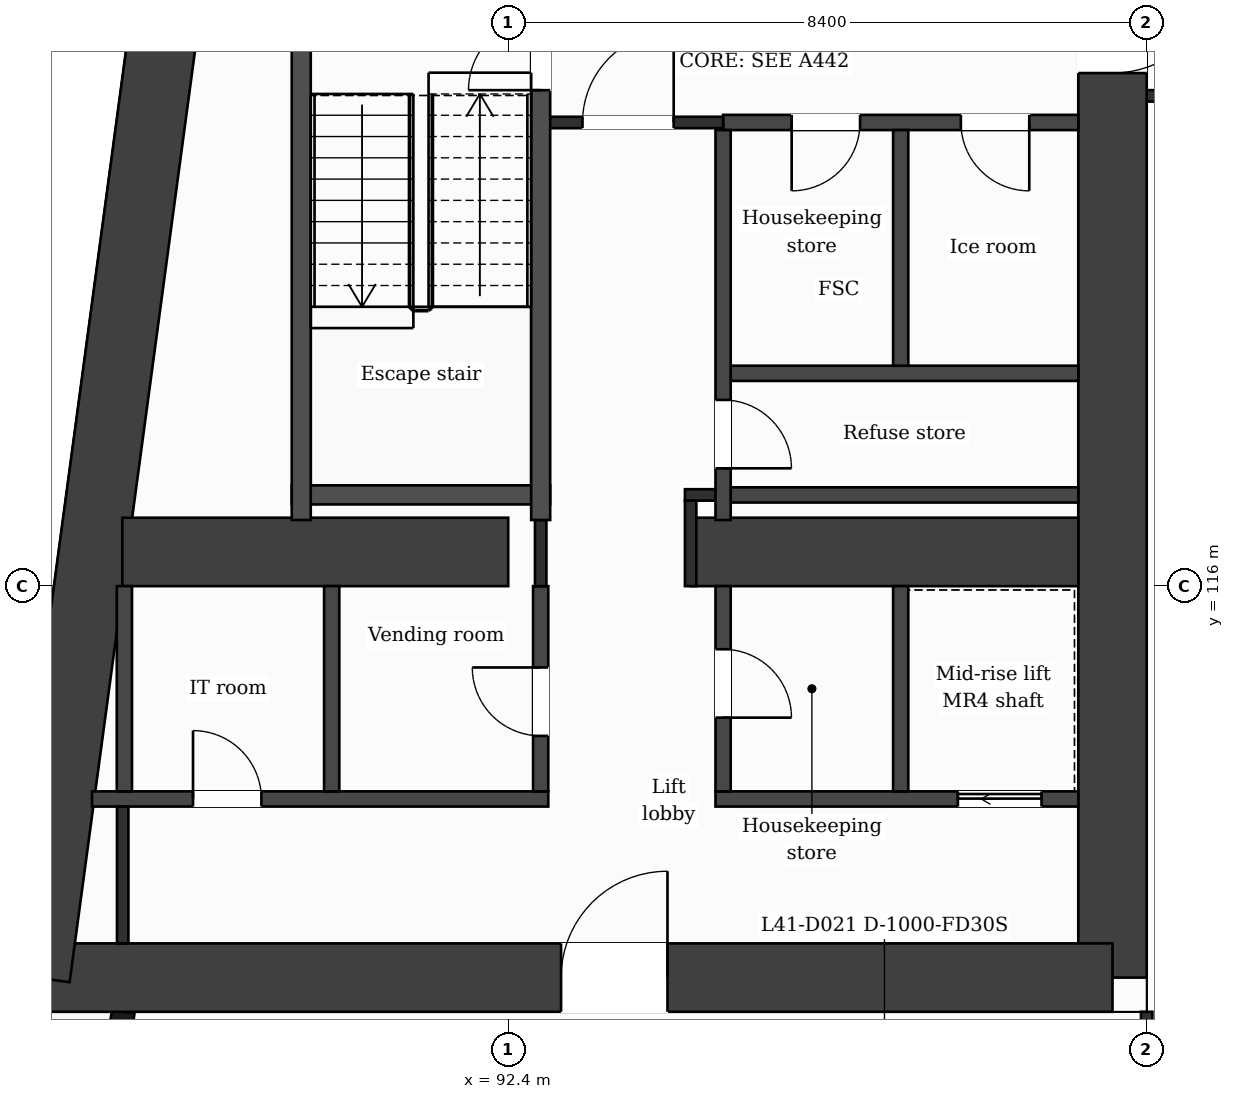
"""IFC4 building model, lengths in metres.
Left out: names, types, materials, properties, quantities, classifications, styles, units other than length and angle.
Written with IfcOpenShell. Run it as: python <this file> out.ifc"""

import sys

from ifc_helpers import new_model, si_unit, direction, frame, frame_2d, origin, place, context, subcontext, project, spatial, rectangle, extrude, element, fill, save


model = new_model("IFC4")
c1 = context("Model", 3, precision=1e-05, world=origin(), true_north=direction((0.0, 1.0)))
c2 = subcontext(c1, "Body", "Model", "MODEL_VIEW")
j1 = project(units=[si_unit("LENGTHUNIT", "METRE"), si_unit("PLANEANGLEUNIT", "RADIAN")], contexts=[c1])
p1 = place(None, origin())
s1 = spatial("IfcSite", under=j1, at=p1, CompositionType="ELEMENT")
p2 = place(p1, origin())
s2 = spatial("IfcBuilding", under=s1, at=p2, CompositionType="ELEMENT")
p3 = place(p2, frame((0.0, 0.0, 173.7)))
s3 = spatial("IfcBuildingStorey", under=s2, at=p3, CompositionType="ELEMENT", Elevation=173.7)
p4 = place(p3, frame((100.35, 131.95, 0.0), z_axis=(0.0, 0.0, 1.0), x_axis=(0.0, -1.0, 0.0)))
e1 = element("IfcWall", 1, at=p4, inside=s3, PredefinedType="SHEAR", context=c2, shape_type="SweptSolid", body=[
    extrude(rectangle(XDim=21.1, YDim=0.9, at=frame_2d((10.55, 0.0))), origin(), (0.0, 0.0, 1.0), 3.7),
])
p5 = place(p4, frame((7.8, 0.0, 0.0)))
e2 = element("IfcOpeningElement", 2, at=p5, cuts=e1, PredefinedType="OPENING", context=c2, shape_type="SweptSolid", body=[
    extrude(rectangle(XDim=1.4, YDim=2.1, at=frame_2d((0.7, 1.05))), frame((0.0, 0.46, 0.0), z_axis=(0.0, -1.0, 0.0), x_axis=(1.0, 0.0, 0.0)), (0.0, 0.0, 1.0), 0.92),
])
p6 = place(p3, frame((100.35, 110.85, 0.0), z_axis=(0.0, 0.0, 1.0), x_axis=(-1.0, 0.0, 0.0)))
e3 = element("IfcWall", 3, at=p6, inside=s3, PredefinedType="SHEAR", context=c2, shape_type="SweptSolid", body=[
    extrude(rectangle(XDim=14.166, YDim=0.9, at=frame_2d((7.083, 0.0))), origin(), (0.0, 0.0, 1.0), 3.7),
])
p7 = place(p6, frame((5.855, 0.0, 0.0)))
e4 = element("IfcOpeningElement", 4, at=p7, cuts=e3, PredefinedType="OPENING", context=c2, shape_type="SweptSolid", body=[
    extrude(rectangle(XDim=1.4, YDim=2.1, at=frame_2d((0.7, 1.05))), frame((0.0, 0.46, 0.0), z_axis=(0.0, -1.0, 0.0), x_axis=(1.0, 0.0, 0.0)), (0.0, 0.0, 1.0), 0.92),
])
p8 = place(p3, frame((86.184, 110.85, 0.0), z_axis=(0.0, 0.0, 1.0), x_axis=(0.133410495943, 0.991060865725, 0.0)))
e5 = element("IfcWall", 5, at=p8, inside=s3, PredefinedType="SHEAR", context=c2, shape_type="SweptSolid", body=[
    extrude(rectangle(XDim=21.29, YDim=0.9, at=frame_2d((10.645, 0.0))), origin(), (0.0, 0.0, 1.0), 3.7),
])
p9 = place(p3, frame((87.323, 116.45, 0.0), z_axis=(0.0, 0.0, 1.0), x_axis=(1.0, 0.0, 0.0)))
e6 = element("IfcWall", 6, at=p9, inside=s3, PredefinedType="SHEAR", context=c2, shape_type="SweptSolid", body=[
    extrude(rectangle(XDim=5.077, YDim=0.9, at=frame_2d((2.539, 0.0))), origin(), (0.0, 0.0, 1.0), 3.7),
])
p10 = place(p3, frame((94.8, 116.45, 0.0), z_axis=(0.0, 0.0, 1.0), x_axis=(1.0, 0.0, 0.0)))
e7 = element("IfcWall", 7, at=p10, inside=s3, PredefinedType="SHEAR", context=c2, shape_type="SweptSolid", body=[
    extrude(rectangle(XDim=5.1, YDim=0.9, at=frame_2d((2.55, 0.0))), origin(), (0.0, 0.0, 1.0), 3.7),
])
p11 = place(p3, frame((87.334, 110.4, 0.0), z_axis=(0.0, 0.0, 1.0), x_axis=(-0.133437175554, -0.991057273915, 0.0)))
e8 = element("IfcWall", 8, at=p11, inside=s3, PredefinedType="SOLIDWALL", context=c2, shape_type="SweptSolid", body=[
    extrude(rectangle(XDim=6.781, YDim=0.3, at=frame_2d((3.39, 0.0))), origin(), (0.0, 0.0, 1.0), 3.38),
])
p12 = place(p11, frame((1.418, 0.0, 0.0)))
e9 = element("IfcOpeningElement", 9, at=p12, cuts=e8, PredefinedType="OPENING", context=c2, shape_type="SweptSolid", body=[
    extrude(rectangle(XDim=1.2, YDim=2.4, at=frame_2d((0.6, 1.2))), frame((0.0, 0.16, 0.0), z_axis=(0.0, -1.0, 0.0), x_axis=(1.0, 0.0, 0.0)), (0.0, 0.0, 1.0), 0.32),
])
p13 = place(p11, frame((4.758, 0.0, 0.9)))
e10 = element("IfcOpeningElement", 10, at=p13, cuts=e8, PredefinedType="OPENING", context=c2, shape_type="SweptSolid", body=[
    extrude(rectangle(XDim=1.2, YDim=2.1, at=frame_2d((0.6, 1.05))), frame((0.0, 0.16, 0.0), z_axis=(0.0, -1.0, 0.0), x_axis=(1.0, 0.0, 0.0)), (0.0, 0.0, 1.0), 0.32),
])
p14 = place(p3, frame((86.924, 113.2, 0.0), z_axis=(0.0, 0.0, 1.0), x_axis=(1.0, 0.0, 0.0)))
e11 = element("IfcWall", 11, at=p14, inside=s3, PredefinedType="PARTITIONING", context=c2, shape_type="SweptSolid", body=[
    extrude(rectangle(XDim=6.003, YDim=0.2, at=frame_2d((3.001, 0.0))), origin(), (0.0, 0.0, 1.0), 3.38),
])
p15 = place(p14, frame((1.329, 0.0, 0.0)))
e12 = element("IfcOpeningElement", 12, at=p15, cuts=e11, PredefinedType="OPENING", context=c2, shape_type="SweptSolid", body=[
    extrude(rectangle(XDim=0.9, YDim=2.1, at=frame_2d((0.45, 1.05))), frame((0.0, 0.11, 0.0), z_axis=(0.0, -1.0, 0.0), x_axis=(1.0, 0.0, 0.0)), (0.0, 0.0, 1.0), 0.22),
])
p16 = place(p3, frame((95.127, 113.2, 0.0), z_axis=(0.0, 0.0, 1.0), x_axis=(1.0, 0.0, 0.0)))
e13 = element("IfcWall", 13, at=p16, inside=s3, PredefinedType="PARTITIONING", context=c2, shape_type="SweptSolid", body=[
    extrude(rectangle(XDim=4.773, YDim=0.2, at=frame_2d((2.386, 0.0))), origin(), (0.0, 0.0, 1.0), 3.38),
])
p17 = place(p16, frame((3.189, 0.0, 0.0)))
e14 = element("IfcOpeningElement", 14, at=p17, cuts=e13, PredefinedType="OPENING", context=c2, shape_type="SweptSolid", body=[
    extrude(rectangle(XDim=1.1, YDim=2.1, at=frame_2d((0.55, 1.05))), frame((0.0, 0.11, 0.0), z_axis=(0.0, -1.0, 0.0), x_axis=(1.0, 0.0, 0.0)), (0.0, 0.0, 1.0), 0.22),
])
p18 = place(p3, frame((95.227, 117.2, 0.0), z_axis=(0.0, 0.0, 1.0), x_axis=(1.0, 0.0, 0.0)))
e15 = element("IfcWall", 15, at=p18, inside=s3, PredefinedType="PARTITIONING", context=c2, shape_type="SweptSolid", body=[
    extrude(rectangle(XDim=4.673, YDim=0.2, at=frame_2d((2.336, 0.0))), origin(), (0.0, 0.0, 1.0), 3.38),
])
p19 = place(p3, frame((94.725, 117.2, 0.0), z_axis=(0.0, 0.0, 1.0), x_axis=(1.0, 0.0, 0.0)))
e16 = element("IfcWall", 16, at=p19, inside=s3, PredefinedType="PARTITIONING", context=c2, shape_type="SweptSolid", body=[
    extrude(rectangle(XDim=0.502, YDim=0.15, at=frame_2d((0.251, 0.0))), origin(), (0.0, 0.0, 1.0), 3.38),
])
p20 = place(p3, frame((89.552, 117.2, 0.0), z_axis=(0.0, 0.0, 1.0), x_axis=(1.0, 0.0, 0.0)))
e17 = element("IfcWall", 17, at=p20, inside=s3, PredefinedType="PARTITIONING", context=c2, shape_type="SweptSolid", body=[
    extrude(rectangle(XDim=3.4, YDim=0.25, at=frame_2d((1.7, 0.0))), origin(), (0.0, 0.0, 1.0), 3.38),
])
p21 = place(p3, frame((95.227, 118.8, 0.0), z_axis=(0.0, 0.0, 1.0), x_axis=(1.0, 0.0, 0.0)))
e18 = element("IfcWall", 18, at=p21, inside=s3, PredefinedType="PARTITIONING", context=c2, shape_type="SweptSolid", body=[
    extrude(rectangle(XDim=4.673, YDim=0.2, at=frame_2d((2.336, 0.0))), origin(), (0.0, 0.0, 1.0), 3.38),
])
p22 = place(p3, frame((95.227, 122.1, 0.0), z_axis=(0.0, 0.0, 1.0), x_axis=(1.0, 0.0, 0.0)))
e19 = element("IfcWall", 19, at=p22, inside=s3, PredefinedType="PARTITIONING", context=c2, shape_type="SweptSolid", body=[
    extrude(rectangle(XDim=4.673, YDim=0.2, at=frame_2d((2.336, 0.0))), origin(), (0.0, 0.0, 1.0), 3.38),
])
p23 = place(p22, frame((0.902, 0.0, 0.0)))
e20 = element("IfcOpeningElement", 20, at=p23, cuts=e19, PredefinedType="OPENING", context=c2, shape_type="SweptSolid", body=[
    extrude(rectangle(XDim=0.9, YDim=2.1, at=frame_2d((0.45, 1.05))), frame((0.0, 0.11, 0.0), z_axis=(0.0, -1.0, 0.0), x_axis=(1.0, 0.0, 0.0)), (0.0, 0.0, 1.0), 0.22),
])
p24 = place(p22, frame((3.128, 0.0, 0.0)))
e21 = element("IfcOpeningElement", 21, at=p24, cuts=e19, PredefinedType="OPENING", context=c2, shape_type="SweptSolid", body=[
    extrude(rectangle(XDim=0.9, YDim=2.1, at=frame_2d((0.45, 1.05))), frame((0.0, 0.11, 0.0), z_axis=(0.0, -1.0, 0.0), x_axis=(1.0, 0.0, 0.0)), (0.0, 0.0, 1.0), 0.22),
])
p25 = place(p3, frame((92.827, 122.1, 0.0), z_axis=(0.0, 0.0, 1.0), x_axis=(1.0, 0.0, 0.0)))
e22 = element("IfcWall", 22, at=p25, inside=s3, PredefinedType="PARTITIONING", context=c2, shape_type="SweptSolid", body=[
    extrude(rectangle(XDim=2.4, YDim=0.15, at=frame_2d((1.2, 0.0))), origin(), (0.0, 0.0, 1.0), 3.38),
])
p26 = place(p25, frame((0.55, 0.0, 0.0)))
e23 = element("IfcOpeningElement", 23, at=p26, cuts=e22, PredefinedType="OPENING", context=c2, shape_type="SweptSolid", body=[
    extrude(rectangle(XDim=1.2, YDim=2.1, at=frame_2d((0.6, 1.05))), frame((0.0, 0.085, 0.0), z_axis=(0.0, -1.0, 0.0), x_axis=(1.0, 0.0, 0.0)), (0.0, 0.0, 1.0), 0.17),
])
p27 = place(p3, frame((100.8, 122.45, 0.0), z_axis=(0.0, 0.0, 1.0), x_axis=(1.0, 0.0, 0.0)))
e24 = element("IfcWall", 24, at=p27, inside=s3, PredefinedType="PARTITIONING", context=c2, shape_type="SweptSolid", body=[
    extrude(rectangle(XDim=25.2, YDim=0.15, at=frame_2d((12.6, 0.0))), origin(), (0.0, 0.0, 1.0), 3.38),
])
p28 = place(p3, frame((87.35, 113.3, 0.0), z_axis=(0.0, 0.0, 1.0), x_axis=(0.0, 1.0, 0.0)))
e25 = element("IfcWall", 25, at=p28, inside=s3, PredefinedType="PARTITIONING", context=c2, shape_type="SweptSolid", body=[
    extrude(rectangle(XDim=2.7, YDim=0.2, at=frame_2d((1.35, 0.0))), origin(), (0.0, 0.0, 1.0), 3.38),
])
p29 = place(p3, frame((87.328, 111.3, 0.0), z_axis=(0.0, 0.0, 1.0), x_axis=(0.0, 1.0, 0.0)))
e26 = element("IfcWall", 26, at=p29, inside=s3, PredefinedType="PARTITIONING", context=c2, shape_type="SweptSolid", body=[
    extrude(rectangle(XDim=1.8, YDim=0.15, at=frame_2d((0.9, 0.0))), origin(), (0.0, 0.0, 1.0), 3.38),
])
p30 = place(p3, frame((89.677, 116.87, 0.0), z_axis=(0.0, 0.0, 1.0), x_axis=(0.0, 1.0, 0.0)))
e27 = element("IfcWall", 27, at=p30, inside=s3, PredefinedType="PARTITIONING", context=c2, shape_type="SweptSolid", body=[
    extrude(rectangle(XDim=6.955, YDim=0.25, at=frame_2d((3.478, 0.0))), origin(), (0.0, 0.0, 1.0), 3.38),
])
p31 = place(p3, frame((90.077, 113.3, 0.0), z_axis=(0.0, 0.0, 1.0), x_axis=(0.0, 1.0, 0.0)))
e28 = element("IfcWall", 28, at=p31, inside=s3, PredefinedType="PARTITIONING", context=c2, shape_type="SweptSolid", body=[
    extrude(rectangle(XDim=2.7, YDim=0.2, at=frame_2d((1.35, 0.0))), origin(), (0.0, 0.0, 1.0), 3.38),
])
p32 = place(p3, frame((92.827, 113.3, 0.0), z_axis=(0.0, 0.0, 1.0), x_axis=(0.0, 1.0, 0.0)))
e29 = element("IfcWall", 29, at=p32, inside=s3, PredefinedType="PARTITIONING", context=c2, shape_type="SweptSolid", body=[
    extrude(rectangle(XDim=2.7, YDim=0.2, at=frame_2d((1.35, 0.0))), origin(), (0.0, 0.0, 1.0), 3.38),
])
p33 = place(p32, frame((0.73, 0.0, 0.0)))
e30 = element("IfcOpeningElement", 30, at=p33, cuts=e29, PredefinedType="OPENING", context=c2, shape_type="SweptSolid", body=[
    extrude(rectangle(XDim=0.9, YDim=2.1, at=frame_2d((0.45, 1.05))), frame((0.0, 0.11, 0.0), z_axis=(0.0, -1.0, 0.0), x_axis=(1.0, 0.0, 0.0)), (0.0, 0.0, 1.0), 0.22),
])
p34 = place(p3, frame((92.827, 116.0, 0.0), z_axis=(0.0, 0.0, 1.0), x_axis=(0.0, 1.0, 0.0)))
e31 = element("IfcWall", 31, at=p34, inside=s3, PredefinedType="PARTITIONING", context=c2, shape_type="SweptSolid", body=[
    extrude(rectangle(XDim=0.87, YDim=0.15, at=frame_2d((0.435, 0.0))), origin(), (0.0, 0.0, 1.0), 3.38),
])
p35 = place(p3, frame((92.827, 116.87, 0.0), z_axis=(0.0, 0.0, 1.0), x_axis=(0.0, 1.0, 0.0)))
e32 = element("IfcWall", 32, at=p35, inside=s3, PredefinedType="PARTITIONING", context=c2, shape_type="SweptSolid", body=[
    extrude(rectangle(XDim=6.955, YDim=0.25, at=frame_2d((3.478, 0.0))), origin(), (0.0, 0.0, 1.0), 3.38),
])
p36 = place(p35, frame((5.655, 0.0, 0.0)))
e33 = element("IfcOpeningElement", 33, at=p36, cuts=e32, PredefinedType="OPENING", context=c2, shape_type="SweptSolid", body=[
    extrude(rectangle(XDim=0.95, YDim=2.1, at=frame_2d((0.475, 1.05))), frame((0.0, 0.135, 0.0), z_axis=(0.0, -1.0, 0.0), x_axis=(1.0, 0.0, 0.0)), (0.0, 0.0, 1.0), 0.27),
])
p37 = place(p3, frame((94.8, 116.0, 0.0), z_axis=(0.0, 0.0, 1.0), x_axis=(0.0, 1.0, 0.0)))
e34 = element("IfcWall", 34, at=p37, inside=s3, PredefinedType="PARTITIONING", context=c2, shape_type="SweptSolid", body=[
    extrude(rectangle(XDim=1.125, YDim=0.15, at=frame_2d((0.562, 0.0))), origin(), (0.0, 0.0, 1.0), 3.38),
])
p38 = place(p3, frame((95.227, 113.3, 0.0), z_axis=(0.0, 0.0, 1.0), x_axis=(0.0, 1.0, 0.0)))
e35 = element("IfcWall", 35, at=p38, inside=s3, PredefinedType="PARTITIONING", context=c2, shape_type="SweptSolid", body=[
    extrude(rectangle(XDim=2.7, YDim=0.2, at=frame_2d((1.35, 0.0))), origin(), (0.0, 0.0, 1.0), 3.38),
])
p39 = place(p38, frame((0.97, 0.0, 0.0)))
e36 = element("IfcOpeningElement", 36, at=p39, cuts=e35, PredefinedType="OPENING", context=c2, shape_type="SweptSolid", body=[
    extrude(rectangle(XDim=0.9, YDim=2.1, at=frame_2d((0.45, 1.05))), frame((0.0, 0.11, 0.0), z_axis=(0.0, -1.0, 0.0), x_axis=(1.0, 0.0, 0.0)), (0.0, 0.0, 1.0), 0.22),
])
p40 = place(p3, frame((95.227, 116.87, 0.0), z_axis=(0.0, 0.0, 1.0), x_axis=(0.0, 1.0, 0.0)))
e37 = element("IfcWall", 37, at=p40, inside=s3, PredefinedType="PARTITIONING", context=c2, shape_type="SweptSolid", body=[
    extrude(rectangle(XDim=5.13, YDim=0.2, at=frame_2d((2.565, 0.0))), origin(), (0.0, 0.0, 1.0), 3.38),
])
p41 = place(p40, frame((0.68, 0.0, 0.0)))
e38 = element("IfcOpeningElement", 38, at=p41, cuts=e37, PredefinedType="OPENING", context=c2, shape_type="SweptSolid", body=[
    extrude(rectangle(XDim=0.9, YDim=2.1, at=frame_2d((0.45, 1.05))), frame((0.0, 0.11, 0.0), z_axis=(0.0, -1.0, 0.0), x_axis=(1.0, 0.0, 0.0)), (0.0, 0.0, 1.0), 0.22),
])
p42 = place(p3, frame((97.563, 113.3, 0.0), z_axis=(0.0, 0.0, 1.0), x_axis=(0.0, 1.0, 0.0)))
e39 = element("IfcWall", 39, at=p42, inside=s3, PredefinedType="PARTITIONING", context=c2, shape_type="SweptSolid", body=[
    extrude(rectangle(XDim=2.7, YDim=0.2, at=frame_2d((1.35, 0.0))), origin(), (0.0, 0.0, 1.0), 3.38),
])
p43 = place(p3, frame((97.563, 118.9, 0.0), z_axis=(0.0, 0.0, 1.0), x_axis=(0.0, 1.0, 0.0)))
e40 = element("IfcWall", 40, at=p43, inside=s3, PredefinedType="PARTITIONING", context=c2, shape_type="SweptSolid", body=[
    extrude(rectangle(XDim=3.1, YDim=0.2, at=frame_2d((1.55, 0.0))), origin(), (0.0, 0.0, 1.0), 3.38),
])
p44 = place(p3, frame((100.8, 109.075, 0.0), z_axis=(0.0, 0.0, 1.0), x_axis=(0.0, 1.0, 0.0)))
e41 = element("IfcWall", 41, at=p44, inside=s3, PredefinedType="PARTITIONING", context=c2, shape_type="SweptSolid", body=[
    extrude(rectangle(XDim=1.325, YDim=0.15, at=frame_2d((0.663, 0.0))), origin(), (0.0, 0.0, 1.0), 3.38),
])
p45 = place(p26, origin())
e42 = element("IfcDoor", 42, at=p45, inside=s3, OperationType="SINGLE_SWING_RIGHT", PredefinedType="DOOR", context=c2, shape_type="SweptSolid", body=[
    extrude(rectangle(XDim=1.2, YDim=2.1, at=frame_2d((0.6, 1.05))), frame((0.0, 0.025, 0.0), z_axis=(0.0, -1.0, 0.0), x_axis=(1.0, 0.0, 0.0)), (0.0, 0.0, 1.0), 0.05),
])
fill(e23, e42)
p46 = place(p23, origin())
e43 = element("IfcDoor", 43, at=p46, inside=s3, OperationType="SINGLE_SWING_LEFT", PredefinedType="DOOR", context=c2, shape_type="SweptSolid", body=[
    extrude(rectangle(XDim=0.9, YDim=2.1, at=frame_2d((0.45, 1.05))), frame((0.0, 0.025, 0.0), z_axis=(0.0, -1.0, 0.0), x_axis=(1.0, 0.0, 0.0)), (0.0, 0.0, 1.0), 0.05),
])
fill(e20, e43)
p47 = place(p24, origin())
e44 = element("IfcDoor", 44, at=p47, inside=s3, OperationType="SINGLE_SWING_RIGHT", PredefinedType="DOOR", context=c2, shape_type="SweptSolid", body=[
    extrude(rectangle(XDim=0.9, YDim=2.1, at=frame_2d((0.45, 1.05))), frame((0.0, 0.025, 0.0), z_axis=(0.0, -1.0, 0.0), x_axis=(1.0, 0.0, 0.0)), (0.0, 0.0, 1.0), 0.05),
])
fill(e21, e44)
p48 = place(p36, origin())
e45 = element("IfcDoor", 45, at=p48, inside=s3, OperationType="SINGLE_SWING_LEFT", PredefinedType="DOOR", context=c2, shape_type="SweptSolid", body=[
    extrude(rectangle(XDim=0.95, YDim=2.1, at=frame_2d((0.475, 1.05))), frame((0.0, 0.025, 0.0), z_axis=(0.0, -1.0, 0.0), x_axis=(1.0, 0.0, 0.0)), (0.0, 0.0, 1.0), 0.05),
])
fill(e33, e45)
p49 = place(p41, origin())
e46 = element("IfcDoor", 46, at=p49, inside=s3, OperationType="SINGLE_SWING_LEFT", PredefinedType="DOOR", context=c2, shape_type="SweptSolid", body=[
    extrude(rectangle(XDim=0.9, YDim=2.1, at=frame_2d((0.45, 1.05))), frame((0.0, 0.025, 0.0), z_axis=(0.0, -1.0, 0.0), x_axis=(1.0, 0.0, 0.0)), (0.0, 0.0, 1.0), 0.05),
])
fill(e38, e46)
p50 = place(p17, origin())
e47 = element("IfcDoor", 47, at=p50, inside=s3, OperationType="SLIDING_TO_LEFT", PredefinedType="DOOR", context=c2, shape_type="SweptSolid", body=[
    extrude(rectangle(XDim=1.1, YDim=2.1, at=frame_2d((0.55, 1.05))), frame((0.0, 0.025, 0.0), z_axis=(0.0, -1.0, 0.0), x_axis=(1.0, 0.0, 0.0)), (0.0, 0.0, 1.0), 0.05),
])
fill(e14, e47)
p51 = place(p15, origin())
e48 = element("IfcDoor", 48, at=p51, inside=s3, OperationType="SINGLE_SWING_LEFT", PredefinedType="DOOR", context=c2, shape_type="SweptSolid", body=[
    extrude(rectangle(XDim=0.9, YDim=2.1, at=frame_2d((0.45, 1.05))), frame((0.0, 0.025, 0.0), z_axis=(0.0, -1.0, 0.0), x_axis=(1.0, 0.0, 0.0)), (0.0, 0.0, 1.0), 0.05),
])
fill(e12, e48)
p52 = place(p33, origin())
e49 = element("IfcDoor", 49, at=p52, inside=s3, OperationType="SINGLE_SWING_RIGHT", PredefinedType="DOOR", context=c2, shape_type="SweptSolid", body=[
    extrude(rectangle(XDim=0.9, YDim=2.1, at=frame_2d((0.45, 1.05))), frame((0.0, 0.025, 0.0), z_axis=(0.0, -1.0, 0.0), x_axis=(1.0, 0.0, 0.0)), (0.0, 0.0, 1.0), 0.05),
])
fill(e30, e49)
p53 = place(p39, origin())
e50 = element("IfcDoor", 50, at=p53, inside=s3, OperationType="SINGLE_SWING_LEFT", PredefinedType="DOOR", context=c2, shape_type="SweptSolid", body=[
    extrude(rectangle(XDim=0.9, YDim=2.1, at=frame_2d((0.45, 1.05))), frame((0.0, 0.025, 0.0), z_axis=(0.0, -1.0, 0.0), x_axis=(1.0, 0.0, 0.0)), (0.0, 0.0, 1.0), 0.05),
])
fill(e36, e50)
p54 = place(p7, origin())
e51 = element("IfcDoor", 51, at=p54, inside=s3, OperationType="SINGLE_SWING_LEFT", PredefinedType="DOOR", context=c2, shape_type="SweptSolid", body=[
    extrude(rectangle(XDim=1.4, YDim=2.1, at=frame_2d((0.7, 1.05))), frame((0.0, 0.025, 0.0), z_axis=(0.0, -1.0, 0.0), x_axis=(1.0, 0.0, 0.0)), (0.0, 0.0, 1.0), 0.05),
])
fill(e4, e51)
p55 = place(p5, origin())
e52 = element("IfcDoor", 52, at=p55, inside=s3, OperationType="SINGLE_SWING_LEFT", PredefinedType="DOOR", context=c2, shape_type="SweptSolid", body=[
    extrude(rectangle(XDim=1.4, YDim=2.1, at=frame_2d((0.7, 1.05))), frame((0.0, 0.025, 0.0), z_axis=(0.0, -1.0, 0.0), x_axis=(1.0, 0.0, 0.0)), (0.0, 0.0, 1.0), 0.05),
])
fill(e2, e52)
save(model, sys.argv[1])
